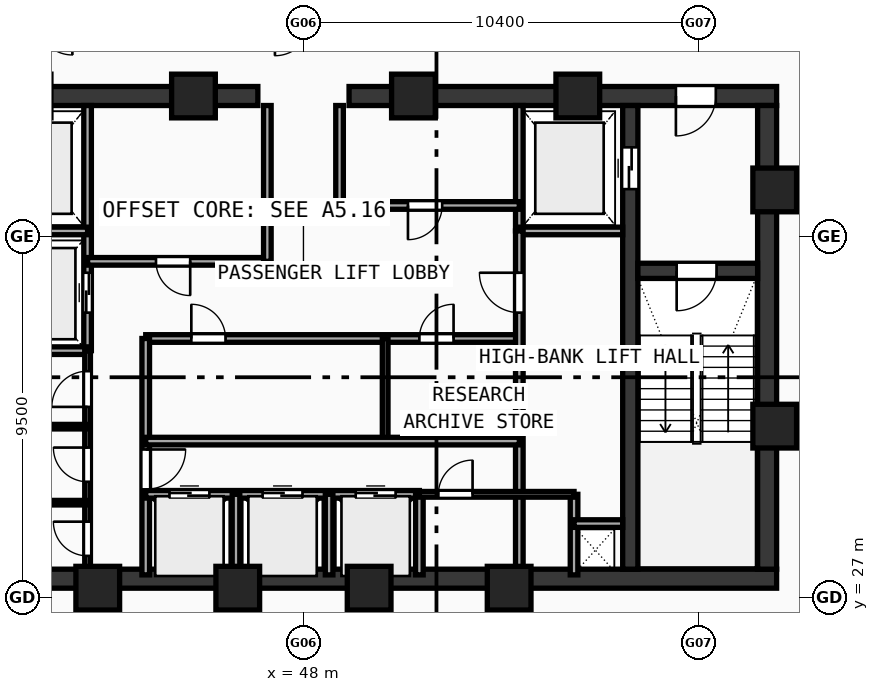
"""IFC4 building model, lengths in metres.
Left out: names, types, materials, properties, quantities, classifications, styles, units other than length and angle.
Written with IfcOpenShell. Run it as: python <this file> out.ifc"""

import sys

from ifc_helpers import new_model, si_unit, direction, frame, frame_2d, origin, origin_with_axes, origin_2d, place, context, subcontext, project, spatial, rectangle, hollow_rectangle, extrude, source, transform, mapped, element, fill, save


model = new_model("IFC4")
c1 = context("Model", 3, precision=1e-05, world=origin(), true_north=direction((0.0, 1.0)))
c2 = subcontext(c1, "Body", "Model", "MODEL_VIEW")
j1 = project(units=[si_unit("LENGTHUNIT", "METRE"), si_unit("PLANEANGLEUNIT", "RADIAN")], contexts=[c1])
p1 = place(None, origin())
s1 = spatial("IfcSite", under=j1, at=p1, CompositionType="ELEMENT")
p2 = place(p1, origin())
s2 = spatial("IfcBuilding", under=s1, at=p2, CompositionType="ELEMENT")
p3 = place(p2, frame((0.0, 0.0, 229.61)))
s3 = spatial("IfcBuildingStorey", under=s2, at=p3, CompositionType="ELEMENT", Elevation=229.61)
p4 = place(p3, frame((35.55, 27.5, 0.0), z_axis=(0.0, 0.0, 1.0), x_axis=(1.0, 0.0, 0.0)))
e1 = element("IfcWall", 1, at=p4, inside=s3, PredefinedType="SHEAR", context=c2, shape_type="SweptSolid", body=[
    extrude(rectangle(XDim=24.9, YDim=0.5, at=frame_2d((12.45, 0.0))), origin(), (0.0, 0.0, 1.0), 3.47),
])
p5 = place(p3, frame((35.55, 40.2, 0.0), z_axis=(0.0, 0.0, 1.0), x_axis=(1.0, 0.0, 0.0)))
e2 = element("IfcWall", 2, at=p5, inside=s3, PredefinedType="SHEAR", context=c2, shape_type="SweptSolid", body=[
    extrude(rectangle(XDim=11.25, YDim=0.5, at=frame_2d((5.625, 0.0))), origin(), (0.0, 0.0, 1.0), 3.47),
])
p6 = place(p5, frame((1.6, 0.0, 0.0)))
e3 = element("IfcOpeningElement", 3, at=p6, cuts=e2, PredefinedType="OPENING", context=c2, shape_type="SweptSolid", body=[
    extrude(rectangle(XDim=1.05, YDim=2.1, at=frame_2d((0.525, 1.05))), frame((0.0, 0.26, 0.0), z_axis=(0.0, -1.0, 0.0), x_axis=(1.0, 0.0, 0.0)), (0.0, 0.0, 1.0), 0.52),
])
p7 = place(p3, frame((49.2, 40.2, 0.0), z_axis=(0.0, 0.0, 1.0), x_axis=(1.0, 0.0, 0.0)))
e4 = element("IfcWall", 4, at=p7, inside=s3, PredefinedType="SHEAR", context=c2, shape_type="SweptSolid", body=[
    extrude(rectangle(XDim=11.25, YDim=0.5, at=frame_2d((5.625, 0.0))), origin(), (0.0, 0.0, 1.0), 3.47),
])
p8 = place(p7, frame((8.6, 0.0, 0.0)))
e5 = element("IfcOpeningElement", 5, at=p8, cuts=e4, PredefinedType="OPENING", context=c2, shape_type="SweptSolid", body=[
    extrude(rectangle(XDim=1.05, YDim=2.1, at=frame_2d((0.525, 1.05))), frame((0.0, 0.26, 0.0), z_axis=(0.0, -1.0, 0.0), x_axis=(1.0, 0.0, 0.0)), (0.0, 0.0, 1.0), 0.52),
])
p9 = place(p3, frame((60.2, 27.75, 0.0), z_axis=(0.0, 0.0, 1.0), x_axis=(0.0, 1.0, 0.0)))
e6 = element("IfcWall", 6, at=p9, inside=s3, PredefinedType="SHEAR", context=c2, shape_type="SweptSolid", body=[
    extrude(rectangle(XDim=12.2, YDim=0.5, at=frame_2d((6.1, 0.0))), origin(), (0.0, 0.0, 1.0), 3.47),
])
p10 = place(p3, frame((56.6, 27.75, 0.0), z_axis=(0.0, 0.0, 1.0), x_axis=(0.0, 1.0, 0.0)))
e7 = element("IfcWall", 7, at=p10, inside=s3, PredefinedType="SHEAR", context=c2, shape_type="SweptSolid", body=[
    extrude(rectangle(XDim=12.2, YDim=0.4, at=frame_2d((6.1, 0.0))), origin(), (0.0, 0.0, 1.0), 3.47),
])
p11 = place(p10, frame((10.0, 0.0, 0.0)))
e8 = element("IfcOpeningElement", 8, at=p11, cuts=e7, PredefinedType="OPENING", context=c2, shape_type="SweptSolid", body=[
    extrude(rectangle(XDim=1.1, YDim=2.1, at=frame_2d((0.55, 1.05))), frame((0.0, 0.21, 0.0), z_axis=(0.0, -1.0, 0.0), x_axis=(1.0, 0.0, 0.0)), (0.0, 0.0, 1.0), 0.42),
])
p12 = place(p3, frame((56.8, 35.6, 0.0), z_axis=(0.0, 0.0, 1.0), x_axis=(1.0, 0.0, 0.0)))
e9 = element("IfcWall", 9, at=p12, inside=s3, PredefinedType="SHEAR", context=c2, shape_type="SweptSolid", body=[
    extrude(rectangle(XDim=3.15, YDim=0.4, at=frame_2d((1.575, 0.0))), origin(), (0.0, 0.0, 1.0), 3.47),
])
p13 = place(p12, frame((1.02, 0.0, 0.0)))
e10 = element("IfcOpeningElement", 10, at=p13, cuts=e9, PredefinedType="OPENING", context=c2, shape_type="SweptSolid", body=[
    extrude(rectangle(XDim=1.05, YDim=2.1, at=frame_2d((0.525, 1.05))), frame((0.0, 0.21, 0.0), z_axis=(0.0, -1.0, 0.0), x_axis=(1.0, 0.0, 0.0)), (0.0, 0.0, 1.0), 0.42),
])
m1 = source(origin(), c2, "Body", "SweptSolid", [
    extrude(hollow_rectangle(XDim=1.15, YDim=1.15, WallThickness=0.048, at=origin_2d()), origin(), (0.0, 0.0, 1.0), 3.73),
])
for number, where, z_axis, x_axis in (
    (11, (42.588, 27.25, -0.26), (0.0, 0.0, 1.0), (1.0, 0.0, 0.0)),
    (12, (46.272, 27.25, -0.26), (0.0, 0.0, 1.0), (1.0, 0.0, 0.0)),
    (13, (49.729, 27.25, -0.26), (0.0, 0.0, 1.0), (1.0, 0.0, 0.0)),
    (14, (53.412, 27.25, -0.26), (0.0, 0.0, 1.0), (1.0, 0.0, 0.0)),
    (15, (60.4, 31.513, -0.26), (0.0, 0.0, 1.0), (1.0, 0.0, 0.0)),
    (16, (60.4, 37.729, -0.26), (0.0, 0.0, 1.0), (1.0, 0.0, 0.0)),
    (17, (55.219, 40.2, -0.26), (0.0, 0.0, 1.0), (1.0, 0.0, 0.0)),
    (18, (50.894, 40.2, -0.26), (0.0, 0.0, 1.0), (1.0, 0.0, 0.0)),
    (19, (45.106, 40.2, -0.26), (0.0, 0.0, 1.0), (1.0, 0.0, 0.0)),
):
    element("IfcColumn", number, at=place(p3, frame(where, z_axis=z_axis, x_axis=x_axis)), inside=s3, PredefinedType="COLUMN", context=c2, shape_type="MappedRepresentation", body=[
        mapped(m1, transform((0.0, 0.0, 0.0), scale=1.0)),
    ])
p14 = place(p3, frame((42.32, 33.5, 0.0), z_axis=(0.0, 0.0, 1.0), x_axis=(0.0, 1.0, 0.0)))
e20 = element("IfcWall", 20, at=p14, inside=s3, PredefinedType="SOLIDWALL", context=c2, shape_type="SweptSolid", body=[
    extrude(rectangle(XDim=6.45, YDim=0.2, at=frame_2d((3.225, 0.0))), origin(), (0.0, 0.0, 1.0), 3.47),
])
p15 = place(p14, frame((1.0, 0.0, 0.0)))
e21 = element("IfcOpeningElement", 21, at=p15, cuts=e20, PredefinedType="OPENING", context=c2, shape_type="SweptSolid", body=[
    extrude(rectangle(XDim=1.05, YDim=2.1, at=frame_2d((0.525, 1.05))), frame((0.0, 0.11, 0.0), z_axis=(0.0, -1.0, 0.0), x_axis=(1.0, 0.0, 0.0)), (0.0, 0.0, 1.0), 0.22),
])
for number, where, z_axis, x_axis in (
    (22, (39.6, 36.65, 0.0), (0.0, 0.0, 1.0), (1.0, 0.0, 0.0)),
    (23, (39.6, 33.5, 0.0), (0.0, 0.0, 1.0), (1.0, 0.0, 0.0)),
):
    element("IfcWall", number, at=place(p3, frame(where, z_axis=z_axis, x_axis=x_axis)), inside=s3, PredefinedType="SOLIDWALL", context=c2, shape_type="SweptSolid", body=[
        extrude(rectangle(XDim=2.72, YDim=0.2, at=frame_2d((1.36, 0.0))), origin(), (0.0, 0.0, 1.0), 3.47),
    ])
p16 = place(p3, frame((53.68, 36.65, 0.0), z_axis=(0.0, 0.0, 1.0), x_axis=(0.0, 1.0, 0.0)))
e24 = element("IfcWall", 24, at=p16, inside=s3, PredefinedType="SOLIDWALL", context=c2, shape_type="SweptSolid", body=[
    extrude(rectangle(XDim=3.3, YDim=0.2, at=frame_2d((1.65, 0.0))), origin(), (0.0, 0.0, 1.0), 3.47),
])
p17 = place(p3, frame((53.68, 36.65, 0.0), z_axis=(0.0, 0.0, 1.0), x_axis=(1.0, 0.0, 0.0)))
e25 = element("IfcWall", 25, at=p17, inside=s3, PredefinedType="SOLIDWALL", context=c2, shape_type="SweptSolid", body=[
    extrude(rectangle(XDim=2.72, YDim=0.2, at=frame_2d((1.36, 0.0))), origin(), (0.0, 0.0, 1.0), 3.47),
])
p18 = place(p3, frame((42.32, 35.85, 0.0), z_axis=(0.0, 0.0, 1.0), x_axis=(1.0, 0.0, 0.0)))
e26 = element("IfcWall", 26, at=p18, inside=s3, PredefinedType="SOLIDWALL", context=c2, shape_type="SweptSolid", body=[
    extrude(rectangle(XDim=4.73, YDim=0.2, at=frame_2d((2.365, 0.0))), origin(), (0.0, 0.0, 1.0), 3.47),
])
p19 = place(p18, frame((1.8, 0.0, 0.0)))
e27 = element("IfcOpeningElement", 27, at=p19, cuts=e26, PredefinedType="OPENING", context=c2, shape_type="SweptSolid", body=[
    extrude(rectangle(XDim=0.9, YDim=2.1, at=frame_2d((0.45, 1.05))), frame((0.0, 0.11, 0.0), z_axis=(0.0, -1.0, 0.0), x_axis=(1.0, 0.0, 0.0)), (0.0, 0.0, 1.0), 0.22),
])
p20 = place(p3, frame((48.95, 37.32, 0.0), z_axis=(0.0, 0.0, 1.0), x_axis=(1.0, 0.0, 0.0)))
e28 = element("IfcWall", 28, at=p20, inside=s3, PredefinedType="SOLIDWALL", context=c2, shape_type="SweptSolid", body=[
    extrude(rectangle(XDim=4.73, YDim=0.2, at=frame_2d((2.365, 0.0))), origin(), (0.0, 0.0, 1.0), 3.47),
])
p21 = place(p20, frame((1.8, 0.0, 0.0)))
e29 = element("IfcOpeningElement", 29, at=p21, cuts=e28, PredefinedType="OPENING", context=c2, shape_type="SweptSolid", body=[
    extrude(rectangle(XDim=0.9, YDim=2.1, at=frame_2d((0.45, 1.05))), frame((0.0, 0.11, 0.0), z_axis=(0.0, -1.0, 0.0), x_axis=(1.0, 0.0, 0.0)), (0.0, 0.0, 1.0), 0.22),
])
p22 = place(p3, frame((47.05, 35.85, 0.0), z_axis=(0.0, 0.0, 1.0), x_axis=(0.0, 1.0, 0.0)))
e30 = element("IfcWall", 30, at=p22, inside=s3, PredefinedType="SOLIDWALL", context=c2, shape_type="SweptSolid", body=[
    extrude(rectangle(XDim=4.1, YDim=0.2, at=frame_2d((2.05, 0.0))), origin(), (0.0, 0.0, 1.0), 3.47),
])
p23 = place(p3, frame((48.95, 37.32, 0.0), z_axis=(0.0, 0.0, 1.0), x_axis=(0.0, 1.0, 0.0)))
e31 = element("IfcWall", 31, at=p23, inside=s3, PredefinedType="SOLIDWALL", context=c2, shape_type="SweptSolid", body=[
    extrude(rectangle(XDim=2.63, YDim=0.2, at=frame_2d((1.315, 0.0))), origin(), (0.0, 0.0, 1.0), 3.47),
])
p24 = place(p3, frame((43.85, 33.82, 0.0), z_axis=(0.0, 0.0, 1.0), x_axis=(1.0, 0.0, 0.0)))
e32 = element("IfcWall", 32, at=p24, inside=s3, PredefinedType="SOLIDWALL", context=c2, shape_type="SweptSolid", body=[
    extrude(rectangle(XDim=9.83, YDim=0.2, at=frame_2d((4.915, 0.0))), origin(), (0.0, 0.0, 1.0), 3.47),
])
p25 = place(p24, frame((1.2, 0.0, 0.0)))
e33 = element("IfcOpeningElement", 33, at=p25, cuts=e32, PredefinedType="OPENING", context=c2, shape_type="SweptSolid", body=[
    extrude(rectangle(XDim=0.9, YDim=2.1, at=frame_2d((0.45, 1.05))), frame((0.0, 0.11, 0.0), z_axis=(0.0, -1.0, 0.0), x_axis=(1.0, 0.0, 0.0)), (0.0, 0.0, 1.0), 0.22),
])
p26 = place(p24, frame((7.2, 0.0, 0.0)))
e34 = element("IfcOpeningElement", 34, at=p26, cuts=e32, PredefinedType="OPENING", context=c2, shape_type="SweptSolid", body=[
    extrude(rectangle(XDim=0.9, YDim=2.1, at=frame_2d((0.45, 1.05))), frame((0.0, 0.11, 0.0), z_axis=(0.0, -1.0, 0.0), x_axis=(1.0, 0.0, 0.0)), (0.0, 0.0, 1.0), 0.22),
])
p27 = place(p3, frame((43.85, 27.6, 0.0), z_axis=(0.0, 0.0, 1.0), x_axis=(0.0, 1.0, 0.0)))
e35 = element("IfcWall", 35, at=p27, inside=s3, PredefinedType="SOLIDWALL", context=c2, shape_type="SweptSolid", body=[
    extrude(rectangle(XDim=6.22, YDim=0.2, at=frame_2d((3.11, 0.0))), origin(), (0.0, 0.0, 1.0), 3.47),
])
p28 = place(p27, frame((2.25, 0.0, 0.0)))
e36 = element("IfcOpeningElement", 36, at=p28, cuts=e35, PredefinedType="OPENING", context=c2, shape_type="SweptSolid", body=[
    extrude(rectangle(XDim=1.05, YDim=2.1, at=frame_2d((0.525, 1.05))), frame((0.0, 0.11, 0.0), z_axis=(0.0, -1.0, 0.0), x_axis=(1.0, 0.0, 0.0)), (0.0, 0.0, 1.0), 0.22),
])
p29 = place(p3, frame((53.68, 27.6, 0.0), z_axis=(0.0, 0.0, 1.0), x_axis=(0.0, 1.0, 0.0)))
e37 = element("IfcWall", 37, at=p29, inside=s3, PredefinedType="SOLIDWALL", context=c2, shape_type="SweptSolid", body=[
    extrude(rectangle(XDim=9.05, YDim=0.2, at=frame_2d((4.525, 0.0))), origin(), (0.0, 0.0, 1.0), 3.47),
])
p30 = place(p29, frame((6.9, 0.0, 0.0)))
e38 = element("IfcOpeningElement", 38, at=p30, cuts=e37, PredefinedType="OPENING", context=c2, shape_type="SweptSolid", body=[
    extrude(rectangle(XDim=1.05, YDim=2.1, at=frame_2d((0.525, 1.05))), frame((0.0, 0.11, 0.0), z_axis=(0.0, -1.0, 0.0), x_axis=(1.0, 0.0, 0.0)), (0.0, 0.0, 1.0), 0.22),
])
p31 = place(p3, frame((50.15, 31.12, 0.0), z_axis=(0.0, 0.0, 1.0), x_axis=(0.0, 1.0, 0.0)))
e39 = element("IfcWall", 39, at=p31, inside=s3, PredefinedType="PARTITIONING", context=c2, shape_type="SweptSolid", body=[
    extrude(rectangle(XDim=2.7, YDim=0.15, at=frame_2d((1.35, 0.0))), origin(), (0.0, 0.0, 1.0), 3.47),
])
p32 = place(p3, frame((43.85, 29.72, 0.0), z_axis=(0.0, 0.0, 1.0), x_axis=(1.0, 0.0, 0.0)))
e40 = element("IfcWall", 40, at=p32, inside=s3, PredefinedType="SOLIDWALL", context=c2, shape_type="SweptSolid", body=[
    extrude(rectangle(XDim=7.2, YDim=0.2, at=frame_2d((3.6, 0.0))), origin(), (0.0, 0.0, 1.0), 3.47),
])
p33 = place(p32, frame((0.625, 0.0, 0.0)))
e41 = element("IfcOpeningElement", 41, at=p33, cuts=e40, PredefinedType="OPENING", context=c2, shape_type="SweptSolid", body=[
    extrude(rectangle(XDim=1.05, YDim=2.1, at=frame_2d((0.525, 1.05))), frame((0.0, 0.11, 0.0), z_axis=(0.0, -1.0, 0.0), x_axis=(1.0, 0.0, 0.0)), (0.0, 0.0, 1.0), 0.22),
])
p34 = place(p32, frame((3.075, 0.0, 0.0)))
e42 = element("IfcOpeningElement", 42, at=p34, cuts=e40, PredefinedType="OPENING", context=c2, shape_type="SweptSolid", body=[
    extrude(rectangle(XDim=1.05, YDim=2.1, at=frame_2d((0.525, 1.05))), frame((0.0, 0.11, 0.0), z_axis=(0.0, -1.0, 0.0), x_axis=(1.0, 0.0, 0.0)), (0.0, 0.0, 1.0), 0.22),
])
p35 = place(p32, frame((5.525, 0.0, 0.0)))
e43 = element("IfcOpeningElement", 43, at=p35, cuts=e40, PredefinedType="OPENING", context=c2, shape_type="SweptSolid", body=[
    extrude(rectangle(XDim=1.05, YDim=2.1, at=frame_2d((0.525, 1.05))), frame((0.0, 0.11, 0.0), z_axis=(0.0, -1.0, 0.0), x_axis=(1.0, 0.0, 0.0)), (0.0, 0.0, 1.0), 0.22),
])
p36 = place(p3, frame((51.05, 27.6, 0.0), z_axis=(0.0, 0.0, 1.0), x_axis=(0.0, 1.0, 0.0)))
e44 = element("IfcWall", 44, at=p36, inside=s3, PredefinedType="SOLIDWALL", context=c2, shape_type="SweptSolid", body=[
    extrude(rectangle(XDim=2.12, YDim=0.2, at=frame_2d((1.06, 0.0))), origin(), (0.0, 0.0, 1.0), 3.47),
])
p37 = place(p3, frame((43.85, 31.12, 0.0), z_axis=(0.0, 0.0, 1.0), x_axis=(1.0, 0.0, 0.0)))
e45 = element("IfcWall", 45, at=p37, inside=s3, PredefinedType="SOLIDWALL", context=c2, shape_type="SweptSolid", body=[
    extrude(rectangle(XDim=9.83, YDim=0.2, at=frame_2d((4.915, 0.0))), origin(), (0.0, 0.0, 1.0), 3.47),
])
for number, where, z_axis, x_axis in (
    (46, (46.225, 27.6, 0.0), (0.0, 0.0, 1.0), (0.0, 1.0, 0.0)),
    (47, (48.675, 27.6, 0.0), (0.0, 0.0, 1.0), (0.0, 1.0, 0.0)),
    (48, (55.12, 27.6, 0.0), (0.0, 0.0, 1.0), (0.0, 1.0, 0.0)),
):
    element("IfcWall", number, at=place(p3, frame(where, z_axis=z_axis, x_axis=x_axis)), inside=s3, PredefinedType="SOLIDWALL", context=c2, shape_type="SweptSolid", body=[
        extrude(rectangle(XDim=2.12, YDim=0.2, at=frame_2d((1.06, 0.0))), origin(), (0.0, 0.0, 1.0), 3.47),
    ])
p38 = place(p3, frame((55.12, 28.95, 0.0), z_axis=(0.0, 0.0, 1.0), x_axis=(1.0, 0.0, 0.0)))
e49 = element("IfcWall", 49, at=p38, inside=s3, PredefinedType="SOLIDWALL", context=c2, shape_type="SweptSolid", body=[
    extrude(rectangle(XDim=1.28, YDim=0.2, at=frame_2d((0.64, 0.0))), origin(), (0.0, 0.0, 1.0), 3.47),
])
p39 = place(p3, frame((42.32, 27.6, 0.0), z_axis=(0.0, 0.0, 1.0), x_axis=(0.0, 1.0, 0.0)))
e50 = element("IfcWall", 50, at=p39, inside=s3, PredefinedType="PARTITIONING", context=c2, shape_type="SweptSolid", body=[
    extrude(rectangle(XDim=5.9, YDim=0.15, at=frame_2d((2.95, 0.0))), origin(), (0.0, 0.0, 1.0), 3.47),
])
p40 = place(p39, frame((0.5, 0.0, 0.0)))
e51 = element("IfcOpeningElement", 51, at=p40, cuts=e50, PredefinedType="OPENING", context=c2, shape_type="SweptSolid", body=[
    extrude(rectangle(XDim=0.9, YDim=2.1, at=frame_2d((0.45, 1.05))), frame((0.0, 0.085, 0.0), z_axis=(0.0, -1.0, 0.0), x_axis=(1.0, 0.0, 0.0)), (0.0, 0.0, 1.0), 0.17),
])
p41 = place(p39, frame((2.45, 0.0, 0.0)))
e52 = element("IfcOpeningElement", 52, at=p41, cuts=e50, PredefinedType="OPENING", context=c2, shape_type="SweptSolid", body=[
    extrude(rectangle(XDim=0.9, YDim=2.1, at=frame_2d((0.45, 1.05))), frame((0.0, 0.085, 0.0), z_axis=(0.0, -1.0, 0.0), x_axis=(1.0, 0.0, 0.0)), (0.0, 0.0, 1.0), 0.17),
])
p42 = place(p39, frame((4.42, 0.0, 0.0)))
e53 = element("IfcOpeningElement", 53, at=p42, cuts=e50, PredefinedType="OPENING", context=c2, shape_type="SweptSolid", body=[
    extrude(rectangle(XDim=0.94, YDim=2.1, at=frame_2d((0.47, 1.05))), frame((0.0, 0.085, 0.0), z_axis=(0.0, -1.0, 0.0), x_axis=(1.0, 0.0, 0.0)), (0.0, 0.0, 1.0), 0.17),
])
p43 = place(p3, frame((51.05, 29.72, 0.0), z_axis=(0.0, 0.0, 1.0), x_axis=(1.0, 0.0, 0.0)))
e54 = element("IfcWall", 54, at=p43, inside=s3, PredefinedType="PARTITIONING", context=c2, shape_type="SweptSolid", body=[
    extrude(rectangle(XDim=4.07, YDim=0.15, at=frame_2d((2.035, 0.0))), origin(), (0.0, 0.0, 1.0), 3.47),
])
p44 = place(p43, frame((0.5, 0.0, 0.0)))
e55 = element("IfcOpeningElement", 55, at=p44, cuts=e54, PredefinedType="OPENING", context=c2, shape_type="SweptSolid", body=[
    extrude(rectangle(XDim=0.9, YDim=2.1, at=frame_2d((0.45, 1.05))), frame((0.0, 0.085, 0.0), z_axis=(0.0, -1.0, 0.0), x_axis=(1.0, 0.0, 0.0)), (0.0, 0.0, 1.0), 0.17),
])
for number, where, z_axis, x_axis in (
    (56, (39.6, 29.5, 0.0), (0.0, 0.0, 1.0), (1.0, 0.0, 0.0)),
    (57, (39.6, 31.5, 0.0), (0.0, 0.0, 1.0), (1.0, 0.0, 0.0)),
):
    element("IfcWall", number, at=place(p3, frame(where, z_axis=z_axis, x_axis=x_axis)), inside=s3, PredefinedType="PARTITIONING", context=c2, shape_type="SweptSolid", body=[
        extrude(rectangle(XDim=2.72, YDim=0.12, at=frame_2d((1.36, 0.0))), origin(), (0.0, 0.0, 1.0), 3.47),
    ])
m2 = source(origin(), c2, "Body", "SweptSolid", [
    extrude(rectangle(XDim=1.05, YDim=2.1, at=frame_2d((0.525, 1.05))), frame((0.0, 0.025, 0.0), z_axis=(0.0, -1.0, 0.0), x_axis=(1.0, 0.0, 0.0)), (0.0, 0.0, 1.0), 0.05),
])
p45 = place(p13, frame((1.05, 0.0, 0.0), z_axis=(0.0, 0.0, 1.0), x_axis=(-1.0, 0.0, 0.0)))
e58 = element("IfcDoor", 58, at=p45, inside=s3, OperationType="SINGLE_SWING_RIGHT", PredefinedType="DOOR", context=c2, shape_type="MappedRepresentation", body=[
    mapped(m2, transform((0.0, 0.0, 0.0), scale=1.0)),
])
fill(e10, e58)
p46 = place(p8, frame((1.05, 0.0, 0.0), z_axis=(0.0, 0.0, 1.0), x_axis=(-1.0, 0.0, 0.0)))
e59 = element("IfcDoor", 59, at=p46, inside=s3, OperationType="SINGLE_SWING_RIGHT", PredefinedType="DOOR", context=c2, shape_type="MappedRepresentation", body=[
    mapped(m2, transform((0.0, 0.0, 0.0), scale=1.0)),
])
fill(e5, e59)
m3 = source(origin(), c2, "Body", "SweptSolid", [
    extrude(rectangle(XDim=1.1, YDim=2.1, at=frame_2d((0.55, 1.05))), frame((0.0, 0.025, 0.0), z_axis=(0.0, -1.0, 0.0), x_axis=(1.0, 0.0, 0.0)), (0.0, 0.0, 1.0), 0.05),
])
p47 = place(p11, origin_with_axes())
e60 = element("IfcDoor", 60, at=p47, inside=s3, OperationType="DOUBLE_DOOR_SLIDING", PredefinedType="DOOR", context=c2, shape_type="MappedRepresentation", body=[
    mapped(m3, transform((0.0, 0.0, 0.0), scale=1.0)),
])
fill(e8, e60)
p48 = place(p15, origin_with_axes())
e61 = element("IfcDoor", 61, at=p48, inside=s3, OperationType="DOUBLE_DOOR_SLIDING", PredefinedType="DOOR", context=c2, shape_type="MappedRepresentation", body=[
    mapped(m2, transform((0.0, 0.0, 0.0), scale=1.0)),
])
fill(e21, e61)
m4 = source(origin(), c2, "Body", "SweptSolid", [
    extrude(rectangle(XDim=0.9, YDim=2.1, at=frame_2d((0.45, 1.05))), frame((0.0, 0.025, 0.0), z_axis=(0.0, -1.0, 0.0), x_axis=(1.0, 0.0, 0.0)), (0.0, 0.0, 1.0), 0.05),
])
p49 = place(p19, frame((0.9, 0.0, 0.0), z_axis=(0.0, 0.0, 1.0), x_axis=(-1.0, 0.0, 0.0)))
e62 = element("IfcDoor", 62, at=p49, inside=s3, OperationType="SINGLE_SWING_LEFT", PredefinedType="DOOR", context=c2, shape_type="MappedRepresentation", body=[
    mapped(m4, transform((0.0, 0.0, 0.0), scale=1.0)),
])
fill(e27, e62)
p50 = place(p21, frame((0.9, 0.0, 0.0), z_axis=(0.0, 0.0, 1.0), x_axis=(-1.0, 0.0, 0.0)))
e63 = element("IfcDoor", 63, at=p50, inside=s3, OperationType="SINGLE_SWING_RIGHT", PredefinedType="DOOR", context=c2, shape_type="MappedRepresentation", body=[
    mapped(m4, transform((0.0, 0.0, 0.0), scale=1.0)),
])
fill(e29, e63)
p51 = place(p25, origin_with_axes())
e64 = element("IfcDoor", 64, at=p51, inside=s3, OperationType="SINGLE_SWING_LEFT", PredefinedType="DOOR", context=c2, shape_type="MappedRepresentation", body=[
    mapped(m4, transform((0.0, 0.0, 0.0), scale=1.0)),
])
fill(e33, e64)
p52 = place(p26, origin_with_axes())
e65 = element("IfcDoor", 65, at=p52, inside=s3, OperationType="SINGLE_SWING_RIGHT", PredefinedType="DOOR", context=c2, shape_type="MappedRepresentation", body=[
    mapped(m4, transform((0.0, 0.0, 0.0), scale=1.0)),
])
fill(e34, e65)
p53 = place(p28, frame((1.05, 0.0, 0.0), z_axis=(0.0, 0.0, 1.0), x_axis=(-1.0, 0.0, 0.0)))
e66 = element("IfcDoor", 66, at=p53, inside=s3, OperationType="SINGLE_SWING_LEFT", PredefinedType="DOOR", context=c2, shape_type="MappedRepresentation", body=[
    mapped(m2, transform((0.0, 0.0, 0.0), scale=1.0)),
])
fill(e36, e66)
p54 = place(p30, origin_with_axes())
e67 = element("IfcDoor", 67, at=p54, inside=s3, OperationType="SINGLE_SWING_RIGHT", PredefinedType="DOOR", context=c2, shape_type="MappedRepresentation", body=[
    mapped(m2, transform((0.0, 0.0, 0.0), scale=1.0)),
])
fill(e38, e67)
p55 = place(p33, origin_with_axes())
e68 = element("IfcDoor", 68, at=p55, inside=s3, OperationType="DOUBLE_DOOR_SLIDING", PredefinedType="DOOR", context=c2, shape_type="MappedRepresentation", body=[
    mapped(m2, transform((0.0, 0.0, 0.0), scale=1.0)),
])
fill(e41, e68)
p56 = place(p34, origin_with_axes())
e69 = element("IfcDoor", 69, at=p56, inside=s3, OperationType="DOUBLE_DOOR_SLIDING", PredefinedType="DOOR", context=c2, shape_type="MappedRepresentation", body=[
    mapped(m2, transform((0.0, 0.0, 0.0), scale=1.0)),
])
fill(e42, e69)
p57 = place(p35, origin_with_axes())
e70 = element("IfcDoor", 70, at=p57, inside=s3, OperationType="DOUBLE_DOOR_SLIDING", PredefinedType="DOOR", context=c2, shape_type="MappedRepresentation", body=[
    mapped(m2, transform((0.0, 0.0, 0.0), scale=1.0)),
])
fill(e43, e70)
p58 = place(p40, origin_with_axes())
e71 = element("IfcDoor", 71, at=p58, inside=s3, OperationType="SINGLE_SWING_RIGHT", PredefinedType="DOOR", context=c2, shape_type="MappedRepresentation", body=[
    mapped(m4, transform((0.0, 0.0, 0.0), scale=1.0)),
])
fill(e51, e71)
p59 = place(p41, origin_with_axes())
e72 = element("IfcDoor", 72, at=p59, inside=s3, OperationType="SINGLE_SWING_RIGHT", PredefinedType="DOOR", context=c2, shape_type="MappedRepresentation", body=[
    mapped(m4, transform((0.0, 0.0, 0.0), scale=1.0)),
])
fill(e52, e72)
m5 = source(origin(), c2, "Body", "SweptSolid", [
    extrude(rectangle(XDim=0.94, YDim=2.1, at=frame_2d((0.47, 1.05))), frame((0.0, 0.025, 0.0), z_axis=(0.0, -1.0, 0.0), x_axis=(1.0, 0.0, 0.0)), (0.0, 0.0, 1.0), 0.05),
])
p60 = place(p42, origin_with_axes())
e73 = element("IfcDoor", 73, at=p60, inside=s3, OperationType="SINGLE_SWING_LEFT", PredefinedType="DOOR", context=c2, shape_type="MappedRepresentation", body=[
    mapped(m5, transform((0.0, 0.0, 0.0), scale=1.0)),
])
fill(e53, e73)
p61 = place(p44, origin_with_axes())
e74 = element("IfcDoor", 74, at=p61, inside=s3, OperationType="SINGLE_SWING_RIGHT", PredefinedType="DOOR", context=c2, shape_type="MappedRepresentation", body=[
    mapped(m4, transform((0.0, 0.0, 0.0), scale=1.0)),
])
fill(e55, e74)
save(model, sys.argv[1])
